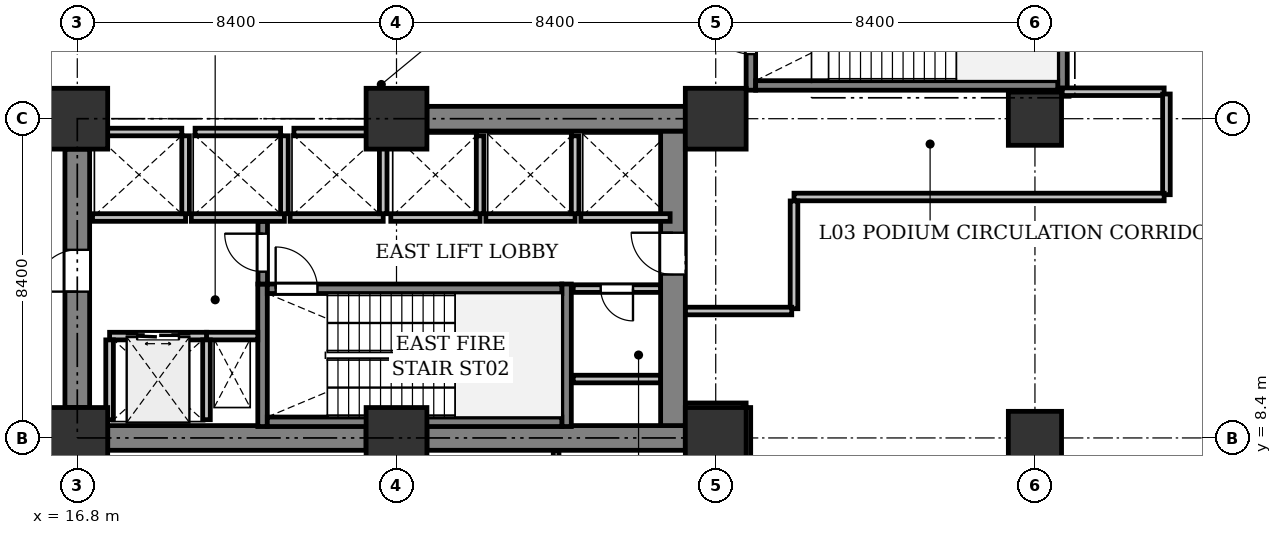
"""IFC4 building model, lengths in metres.
Left out: names, types, materials, properties, quantities, classifications, styles, units other than length and angle.
Written with IfcOpenShell. Run it as: python <this file> out.ifc"""

import sys

from ifc_helpers import new_model, si_unit, direction, frame, frame_2d, origin, origin_2d, place, context, subcontext, project, spatial, rectangle, extrude, element, fill, save


model = new_model("IFC4")
c1 = context("Model", 3, precision=1e-05, world=origin(), true_north=direction((0.0, 1.0)))
c2 = subcontext(c1, "Body", "Model", "MODEL_VIEW")
j1 = project(units=[si_unit("LENGTHUNIT", "METRE"), si_unit("PLANEANGLEUNIT", "RADIAN")], contexts=[c1])
p1 = place(None, origin())
s1 = spatial("IfcSite", under=j1, at=p1, CompositionType="ELEMENT")
p2 = place(p1, origin())
s2 = spatial("IfcBuilding", under=s1, at=p2, CompositionType="ELEMENT")
p3 = place(p2, frame((0.0, 0.0, 15.0)))
s3 = spatial("IfcBuildingStorey", under=s2, at=p3, CompositionType="ELEMENT", Elevation=15.0)
for number, where, z_axis, x_axis in (
    (1, (16.8, 8.4, 0.0), (0.0, 0.0, 1.0), (1.0, 0.0, 0.0)),
    (2, (16.8, 16.8, 0.0), (0.0, 0.0, 1.0), (1.0, 0.0, 0.0)),
    (3, (25.2, 8.4, 0.0), (0.0, 0.0, 1.0), (1.0, 0.0, 0.0)),
    (4, (25.2, 16.8, 0.0), (0.0, 0.0, 1.0), (1.0, 0.0, 0.0)),
    (5, (33.6, 8.4, 0.0), (0.0, 0.0, 1.0), (1.0, 0.0, 0.0)),
    (6, (33.6, 16.8, 0.0), (0.0, 0.0, 1.0), (1.0, 0.0, 0.0)),
):
    element("IfcColumn", number, at=place(p3, frame(where, z_axis=z_axis, x_axis=x_axis)), inside=s3, PredefinedType="COLUMN", context=c2, shape_type="SweptSolid", body=[
        extrude(rectangle(XDim=1.6, YDim=1.6, at=origin_2d()), origin(), (0.0, 0.0, 1.0), 4.8),
    ])
for number, where, z_axis, x_axis in (
    (7, (42.0, 8.4, 0.0), (0.0, 0.0, 1.0), (1.0, 0.0, 0.0)),
    (8, (42.0, 16.8, 0.0), (0.0, 0.0, 1.0), (1.0, 0.0, 0.0)),
):
    element("IfcColumn", number, at=place(p3, frame(where, z_axis=z_axis, x_axis=x_axis)), inside=s3, PredefinedType="COLUMN", context=c2, shape_type="SweptSolid", body=[
        extrude(rectangle(XDim=1.4, YDim=1.4, at=origin_2d()), origin(), (0.0, 0.0, 1.0), 4.8),
    ])
p4 = place(p3, frame((17.6, 8.4, 0.0), z_axis=(0.0, 0.0, 1.0), x_axis=(1.0, 0.0, 0.0)))
e9 = element("IfcWall", 9, at=p4, inside=s3, PredefinedType="SHEAR", context=c2, shape_type="SweptSolid", body=[
    extrude(rectangle(XDim=6.8, YDim=0.65, at=frame_2d((3.4, 0.0))), origin(), (0.0, 0.0, 1.0), 4.45),
])
p5 = place(p3, frame((26.0, 8.4, 0.0), z_axis=(0.0, 0.0, 1.0), x_axis=(1.0, 0.0, 0.0)))
e10 = element("IfcWall", 10, at=p5, inside=s3, PredefinedType="SHEAR", context=c2, shape_type="SweptSolid", body=[
    extrude(rectangle(XDim=6.8, YDim=0.65, at=frame_2d((3.4, 0.0))), origin(), (0.0, 0.0, 1.0), 4.45),
])
p6 = place(p3, frame((32.475, 8.725, 0.0), z_axis=(0.0, 0.0, 1.0), x_axis=(0.0, 1.0, 0.0)))
e11 = element("IfcWall", 11, at=p6, inside=s3, PredefinedType="SHEAR", context=c2, shape_type="SweptSolid", body=[
    extrude(rectangle(XDim=7.75, YDim=0.65, at=frame_2d((3.875, 0.0))), origin(), (0.0, 0.0, 1.0), 4.45),
])
p7 = place(p6, frame((3.975, 0.0, 0.0)))
e12 = element("IfcOpeningElement", 12, at=p7, cuts=e11, PredefinedType="OPENING", context=c2, shape_type="SweptSolid", body=[
    extrude(rectangle(XDim=1.1, YDim=2.15, at=frame_2d((0.55, 1.075))), frame((0.0, 0.335, 0.0), z_axis=(0.0, -1.0, 0.0), x_axis=(1.0, 0.0, 0.0)), (0.0, 0.0, 1.0), 0.67),
])
p8 = place(p3, frame((16.8, 9.2, 0.0), z_axis=(0.0, 0.0, 1.0), x_axis=(0.0, 1.0, 0.0)))
e13 = element("IfcWall", 13, at=p8, inside=s3, PredefinedType="SHEAR", context=c2, shape_type="SweptSolid", body=[
    extrude(rectangle(XDim=6.8, YDim=0.65, at=frame_2d((3.4, 0.0))), origin(), (0.0, 0.0, 1.0), 4.45),
])
p9 = place(p8, frame((3.05, 0.0, 0.0)))
e14 = element("IfcOpeningElement", 14, at=p9, cuts=e13, PredefinedType="OPENING", context=c2, shape_type="SweptSolid", body=[
    extrude(rectangle(XDim=1.1, YDim=2.15, at=frame_2d((0.55, 1.075))), frame((0.0, 0.335, 0.0), z_axis=(0.0, -1.0, 0.0), x_axis=(1.0, 0.0, 0.0)), (0.0, 0.0, 1.0), 0.67),
])
p10 = place(p3, frame((26.0, 16.8, 0.0), z_axis=(0.0, 0.0, 1.0), x_axis=(1.0, 0.0, 0.0)))
e15 = element("IfcWall", 15, at=p10, inside=s3, PredefinedType="SHEAR", context=c2, shape_type="SweptSolid", body=[
    extrude(rectangle(XDim=6.8, YDim=0.65, at=frame_2d((3.4, 0.0))), origin(), (0.0, 0.0, 1.0), 4.45),
])
for number, where, z_axis, x_axis in (
    (16, (21.675, 8.7, 0.0), (0.0, 0.0, 1.0), (0.0, 1.0, 0.0)),
    (17, (29.675, 8.7, 0.0), (0.0, 0.0, 1.0), (0.0, 1.0, 0.0)),
):
    element("IfcWall", number, at=place(p3, frame(where, z_axis=z_axis, x_axis=x_axis)), inside=s3, PredefinedType="SHEAR", context=c2, shape_type="SweptSolid", body=[
        extrude(rectangle(XDim=3.75, YDim=0.25, at=frame_2d((1.875, 0.0))), origin(), (0.0, 0.0, 1.0), 4.45),
    ])
p11 = place(p3, frame((21.8, 8.825, 0.0), z_axis=(0.0, 0.0, 1.0), x_axis=(1.0, 0.0, 0.0)))
e18 = element("IfcWall", 18, at=p11, inside=s3, PredefinedType="SHEAR", context=c2, shape_type="SweptSolid", body=[
    extrude(rectangle(XDim=7.75, YDim=0.25, at=frame_2d((3.875, 0.0))), origin(), (0.0, 0.0, 1.0), 4.45),
])
p12 = place(p3, frame((21.8, 12.325, 0.0), z_axis=(0.0, 0.0, 1.0), x_axis=(1.0, 0.0, 0.0)))
e19 = element("IfcWall", 19, at=p12, inside=s3, PredefinedType="SHEAR", context=c2, shape_type="SweptSolid", body=[
    extrude(rectangle(XDim=7.75, YDim=0.25, at=frame_2d((3.875, 0.0))), origin(), (0.0, 0.0, 1.0), 4.45),
])
p13 = place(p12, frame((0.22, 0.0, 0.0)))
e20 = element("IfcOpeningElement", 20, at=p13, cuts=e19, PredefinedType="OPENING", context=c2, shape_type="SweptSolid", body=[
    extrude(rectangle(XDim=1.1, YDim=2.15, at=frame_2d((0.55, 1.075))), frame((0.0, 0.135, 0.0), z_axis=(0.0, -1.0, 0.0), x_axis=(1.0, 0.0, 0.0)), (0.0, 0.0, 1.0), 0.27),
])
p14 = place(p3, frame((34.525, 17.55, 0.0), z_axis=(0.0, 0.0, 1.0), x_axis=(0.0, 1.0, 0.0)))
e21 = element("IfcWall", 21, at=p14, inside=s3, PredefinedType="SHEAR", context=c2, shape_type="SweptSolid", body=[
    extrude(rectangle(XDim=4.45, YDim=0.25, at=frame_2d((2.225, 0.0))), origin(), (0.0, 0.0, 1.0), 4.45),
])
p15 = place(p14, frame((0.95, 0.0, 0.0)))
e22 = element("IfcOpeningElement", 22, at=p15, cuts=e21, PredefinedType="OPENING", context=c2, shape_type="SweptSolid", body=[
    extrude(rectangle(XDim=1.1, YDim=2.15, at=frame_2d((0.55, 1.075))), frame((0.0, 0.135, 0.0), z_axis=(0.0, -1.0, 0.0), x_axis=(1.0, 0.0, 0.0)), (0.0, 0.0, 1.0), 0.27),
])
p16 = place(p3, frame((42.725, 17.55, 0.0), z_axis=(0.0, 0.0, 1.0), x_axis=(0.0, 1.0, 0.0)))
e23 = element("IfcWall", 23, at=p16, inside=s3, PredefinedType="SHEAR", context=c2, shape_type="SweptSolid", body=[
    extrude(rectangle(XDim=4.45, YDim=0.25, at=frame_2d((2.225, 0.0))), origin(), (0.0, 0.0, 1.0), 4.45),
])
p17 = place(p3, frame((34.65, 17.675, 0.0), z_axis=(0.0, 0.0, 1.0), x_axis=(1.0, 0.0, 0.0)))
e24 = element("IfcWall", 24, at=p17, inside=s3, PredefinedType="SHEAR", context=c2, shape_type="SweptSolid", body=[
    extrude(rectangle(XDim=7.95, YDim=0.25, at=frame_2d((3.975, 0.0))), origin(), (0.0, 0.0, 1.0), 4.45),
])
p18 = place(p3, frame((20.2, 11.08, 0.0), z_axis=(0.0, 0.0, 1.0), x_axis=(1.0, 0.0, 0.0)))
e25 = element("IfcWall", 25, at=p18, inside=s3, PredefinedType="PARTITIONING", context=c2, shape_type="SweptSolid", body=[
    extrude(rectangle(XDim=1.35, YDim=0.2, at=frame_2d((0.675, 0.0))), origin(), (0.0, 0.0, 1.0), 4.45),
])
p19 = place(p3, frame((21.68, 12.45, 0.0), z_axis=(0.0, 0.0, 1.0), x_axis=(0.0, 1.0, 0.0)))
e26 = element("IfcWall", 26, at=p19, inside=s3, PredefinedType="SHEAR", context=c2, shape_type="SweptSolid", body=[
    extrude(rectangle(XDim=1.65, YDim=0.25, at=frame_2d((0.825, 0.0))), origin(), (0.0, 0.0, 1.0), 4.45),
])
p20 = place(p19, frame((0.325, 0.0, 0.0)))
e27 = element("IfcOpeningElement", 27, at=p20, cuts=e26, PredefinedType="OPENING", context=c2, shape_type="SweptSolid", body=[
    extrude(rectangle(XDim=1.0, YDim=2.15, at=frame_2d((0.5, 1.075))), frame((0.0, 0.135, 0.0), z_axis=(0.0, -1.0, 0.0), x_axis=(1.0, 0.0, 0.0)), (0.0, 0.0, 1.0), 0.27),
])
p21 = place(p3, frame((17.65, 11.08, 0.0), z_axis=(0.0, 0.0, 1.0), x_axis=(1.0, 0.0, 0.0)))
e28 = element("IfcWall", 28, at=p21, inside=s3, PredefinedType="PARTITIONING", context=c2, shape_type="SweptSolid", body=[
    extrude(rectangle(XDim=2.55, YDim=0.2, at=frame_2d((1.275, 0.0))), origin(), (0.0, 0.0, 1.0), 4.45),
])
p22 = place(p21, frame((0.725, 0.0, 0.0)))
e29 = element("IfcOpeningElement", 29, at=p22, cuts=e28, PredefinedType="OPENING", context=c2, shape_type="SweptSolid", body=[
    extrude(rectangle(XDim=1.1, YDim=2.2, at=frame_2d((0.55, 1.1))), frame((0.0, 0.11, 0.0), z_axis=(0.0, -1.0, 0.0), x_axis=(1.0, 0.0, 0.0)), (0.0, 0.0, 1.0), 0.22),
])
for number, where, z_axis, x_axis in (
    (30, (20.2, 8.88, 0.0), (0.0, 0.0, 1.0), (0.0, 1.0, 0.0)),
    (31, (17.65, 8.88, 0.0), (0.0, 0.0, 1.0), (0.0, 1.0, 0.0)),
):
    element("IfcWall", number, at=place(p3, frame(where, z_axis=z_axis, x_axis=x_axis)), inside=s3, PredefinedType="PARTITIONING", context=c2, shape_type="SweptSolid", body=[
        extrude(rectangle(XDim=2.1, YDim=0.2, at=frame_2d((1.05, 0.0))), origin(), (0.0, 0.0, 1.0), 4.45),
    ])
p23 = place(p3, frame((17.2, 14.2, 0.0), z_axis=(0.0, 0.0, 1.0), x_axis=(1.0, 0.0, 0.0)))
e32 = element("IfcWall", 32, at=p23, inside=s3, PredefinedType="PARTITIONING", context=c2, shape_type="SweptSolid", body=[
    extrude(rectangle(XDim=2.45, YDim=0.2, at=frame_2d((1.225, 0.0))), origin(), (0.0, 0.0, 1.0), 4.45),
])
p24 = place(p3, frame((19.65, 14.3, 0.0), z_axis=(0.0, 0.0, 1.0), x_axis=(0.0, 1.0, 0.0)))
e33 = element("IfcWall", 33, at=p24, inside=s3, PredefinedType="PARTITIONING", context=c2, shape_type="SweptSolid", body=[
    extrude(rectangle(XDim=2.05, YDim=0.2, at=frame_2d((1.025, 0.0))), origin(), (0.0, 0.0, 1.0), 4.45),
])
p25 = place(p3, frame((17.3, 16.45, 0.0), z_axis=(0.0, 0.0, 1.0), x_axis=(1.0, 0.0, 0.0)))
e34 = element("IfcWall", 34, at=p25, inside=s3, PredefinedType="PARTITIONING", context=c2, shape_type="SweptSolid", body=[
    extrude(rectangle(XDim=2.25, YDim=0.2, at=frame_2d((1.125, 0.0))), origin(), (0.0, 0.0, 1.0), 3.05),
])
p26 = place(p3, frame((19.8, 14.2, 0.0), z_axis=(0.0, 0.0, 1.0), x_axis=(1.0, 0.0, 0.0)))
e35 = element("IfcWall", 35, at=p26, inside=s3, PredefinedType="PARTITIONING", context=c2, shape_type="SweptSolid", body=[
    extrude(rectangle(XDim=2.45, YDim=0.2, at=frame_2d((1.225, 0.0))), origin(), (0.0, 0.0, 1.0), 4.45),
])
p27 = place(p3, frame((22.25, 14.3, 0.0), z_axis=(0.0, 0.0, 1.0), x_axis=(0.0, 1.0, 0.0)))
e36 = element("IfcWall", 36, at=p27, inside=s3, PredefinedType="PARTITIONING", context=c2, shape_type="SweptSolid", body=[
    extrude(rectangle(XDim=2.05, YDim=0.2, at=frame_2d((1.025, 0.0))), origin(), (0.0, 0.0, 1.0), 4.45),
])
p28 = place(p3, frame((19.9, 16.45, 0.0), z_axis=(0.0, 0.0, 1.0), x_axis=(1.0, 0.0, 0.0)))
e37 = element("IfcWall", 37, at=p28, inside=s3, PredefinedType="PARTITIONING", context=c2, shape_type="SweptSolid", body=[
    extrude(rectangle(XDim=2.25, YDim=0.2, at=frame_2d((1.125, 0.0))), origin(), (0.0, 0.0, 1.0), 3.05),
])
p29 = place(p3, frame((22.4, 14.2, 0.0), z_axis=(0.0, 0.0, 1.0), x_axis=(1.0, 0.0, 0.0)))
e38 = element("IfcWall", 38, at=p29, inside=s3, PredefinedType="PARTITIONING", context=c2, shape_type="SweptSolid", body=[
    extrude(rectangle(XDim=2.45, YDim=0.2, at=frame_2d((1.225, 0.0))), origin(), (0.0, 0.0, 1.0), 4.45),
])
p30 = place(p3, frame((24.85, 14.3, 0.0), z_axis=(0.0, 0.0, 1.0), x_axis=(0.0, 1.0, 0.0)))
e39 = element("IfcWall", 39, at=p30, inside=s3, PredefinedType="PARTITIONING", context=c2, shape_type="SweptSolid", body=[
    extrude(rectangle(XDim=2.05, YDim=0.2, at=frame_2d((1.025, 0.0))), origin(), (0.0, 0.0, 1.0), 4.45),
])
p31 = place(p3, frame((22.5, 16.45, 0.0), z_axis=(0.0, 0.0, 1.0), x_axis=(1.0, 0.0, 0.0)))
e40 = element("IfcWall", 40, at=p31, inside=s3, PredefinedType="PARTITIONING", context=c2, shape_type="SweptSolid", body=[
    extrude(rectangle(XDim=2.25, YDim=0.2, at=frame_2d((1.125, 0.0))), origin(), (0.0, 0.0, 1.0), 3.05),
])
p32 = place(p3, frame((25.05, 14.2, 0.0), z_axis=(0.0, 0.0, 1.0), x_axis=(1.0, 0.0, 0.0)))
e41 = element("IfcWall", 41, at=p32, inside=s3, PredefinedType="PARTITIONING", context=c2, shape_type="SweptSolid", body=[
    extrude(rectangle(XDim=2.35, YDim=0.2, at=frame_2d((1.175, 0.0))), origin(), (0.0, 0.0, 1.0), 4.45),
])
p33 = place(p3, frame((27.4, 14.3, 0.0), z_axis=(0.0, 0.0, 1.0), x_axis=(0.0, 1.0, 0.0)))
e42 = element("IfcWall", 42, at=p33, inside=s3, PredefinedType="PARTITIONING", context=c2, shape_type="SweptSolid", body=[
    extrude(rectangle(XDim=2.05, YDim=0.2, at=frame_2d((1.025, 0.0))), origin(), (0.0, 0.0, 1.0), 4.45),
])
p34 = place(p3, frame((27.55, 14.2, 0.0), z_axis=(0.0, 0.0, 1.0), x_axis=(1.0, 0.0, 0.0)))
e43 = element("IfcWall", 43, at=p34, inside=s3, PredefinedType="PARTITIONING", context=c2, shape_type="SweptSolid", body=[
    extrude(rectangle(XDim=2.35, YDim=0.2, at=frame_2d((1.175, 0.0))), origin(), (0.0, 0.0, 1.0), 4.45),
])
p35 = place(p3, frame((29.9, 14.3, 0.0), z_axis=(0.0, 0.0, 1.0), x_axis=(0.0, 1.0, 0.0)))
e44 = element("IfcWall", 44, at=p35, inside=s3, PredefinedType="PARTITIONING", context=c2, shape_type="SweptSolid", body=[
    extrude(rectangle(XDim=2.05, YDim=0.2, at=frame_2d((1.025, 0.0))), origin(), (0.0, 0.0, 1.0), 4.45),
])
p36 = place(p3, frame((30.05, 14.2, 0.0), z_axis=(0.0, 0.0, 1.0), x_axis=(1.0, 0.0, 0.0)))
e45 = element("IfcWall", 45, at=p36, inside=s3, PredefinedType="PARTITIONING", context=c2, shape_type="SweptSolid", body=[
    extrude(rectangle(XDim=2.35, YDim=0.2, at=frame_2d((1.175, 0.0))), origin(), (0.0, 0.0, 1.0), 4.45),
])
p37 = place(p3, frame((32.146, 12.33, 0.0), z_axis=(0.0, 0.0, 1.0), x_axis=(-1.0, 0.0, 0.0)))
e46 = element("IfcWall", 46, at=p37, inside=s3, PredefinedType="PARTITIONING", context=c2, shape_type="SweptSolid", body=[
    extrude(rectangle(XDim=2.296, YDim=0.2, at=frame_2d((1.148, 0.0))), origin(), (0.0, 0.0, 1.0), 4.45),
])
p38 = place(p37, frame((0.723, 0.0, 0.0)))
e47 = element("IfcOpeningElement", 47, at=p38, cuts=e46, PredefinedType="OPENING", context=c2, shape_type="SweptSolid", body=[
    extrude(rectangle(XDim=0.85, YDim=2.15, at=frame_2d((0.425, 1.075))), frame((0.0, 0.11, 0.0), z_axis=(0.0, -1.0, 0.0), x_axis=(1.0, 0.0, 0.0)), (0.0, 0.0, 1.0), 0.22),
])
p39 = place(p3, frame((29.85, 9.95, 0.0), z_axis=(0.0, 0.0, 1.0), x_axis=(1.0, 0.0, 0.0)))
e48 = element("IfcWall", 48, at=p39, inside=s3, PredefinedType="PARTITIONING", context=c2, shape_type="SweptSolid", body=[
    extrude(rectangle(XDim=2.296, YDim=0.2, at=frame_2d((1.148, 0.0))), origin(), (0.0, 0.0, 1.0), 4.45),
])
p40 = place(p3, frame((29.4, 0.52, 0.0), z_axis=(0.0, 0.0, 1.0), x_axis=(0.0, 1.0, 0.0)))
e49 = element("IfcWall", 49, at=p40, inside=s3, PredefinedType="PARTITIONING", context=c2, shape_type="SweptSolid", body=[
    extrude(rectangle(XDim=7.551, YDim=0.15, at=frame_2d((3.775, 0.0))), origin(), (0.0, 0.0, 1.0), 4.044),
])
p41 = place(p3, frame((42.717, 17.51, 0.0), z_axis=(0.0, 0.0, 1.0), x_axis=(1.0, 0.0, 0.0)))
e50 = element("IfcWall", 50, at=p41, inside=s3, PredefinedType="PARTITIONING", context=c2, shape_type="SweptSolid", body=[
    extrude(rectangle(XDim=2.683, YDim=0.2, at=frame_2d((1.341, 0.0))), origin(), (0.0, 0.0, 1.0), 4.45),
])
p42 = place(p3, frame((45.46, 17.45, 0.0), z_axis=(0.0, 0.0, 1.0), x_axis=(0.0, -1.0, 0.0)))
e51 = element("IfcWall", 51, at=p42, inside=s3, PredefinedType="PARTITIONING", context=c2, shape_type="SweptSolid", body=[
    extrude(rectangle(XDim=2.65, YDim=0.2, at=frame_2d((1.325, 0.0))), origin(), (0.0, 0.0, 1.0), 3.05),
])
p43 = place(p3, frame((45.4, 14.74, 0.0), z_axis=(0.0, 0.0, 1.0), x_axis=(-1.0, 0.0, 0.0)))
e52 = element("IfcWall", 52, at=p43, inside=s3, PredefinedType="PARTITIONING", context=c2, shape_type="SweptSolid", body=[
    extrude(rectangle(XDim=9.74, YDim=0.2, at=frame_2d((4.87, 0.0))), origin(), (0.0, 0.0, 1.0), 3.25),
])
p44 = place(p3, frame((35.66, 14.636, 0.0), z_axis=(0.0, 0.0, 1.0), x_axis=(0.0, -1.0, 0.0)))
e53 = element("IfcWall", 53, at=p44, inside=s3, PredefinedType="PARTITIONING", context=c2, shape_type="SweptSolid", body=[
    extrude(rectangle(XDim=2.836, YDim=0.2, at=frame_2d((1.418, 0.0))), origin(), (0.0, 0.0, 1.0), 4.45),
])
p45 = place(p3, frame((35.6, 11.74, 0.0), z_axis=(0.0, 0.0, 1.0), x_axis=(-1.0, 0.0, 0.0)))
e54 = element("IfcWall", 54, at=p45, inside=s3, PredefinedType="PARTITIONING", context=c2, shape_type="SweptSolid", body=[
    extrude(rectangle(XDim=2.796, YDim=0.2, at=frame_2d((1.398, 0.0))), origin(), (0.0, 0.0, 1.0), 3.25),
])
p46 = place(p3, frame((32.804, 9.22, 0.0), z_axis=(0.0, 0.0, 1.0), x_axis=(1.0, 0.0, 0.0)))
e55 = element("IfcWall", 55, at=p46, inside=s3, PredefinedType="PARTITIONING", context=c2, shape_type="SweptSolid", body=[
    extrude(rectangle(XDim=1.596, YDim=0.2, at=frame_2d((0.798, 0.0))), origin(), (0.0, 0.0, 1.0), 3.25),
])
p47 = place(p3, frame((34.42, 9.2, 0.0), z_axis=(0.0, 0.0, 1.0), x_axis=(0.0, -1.0, 0.0)))
e56 = element("IfcWall", 56, at=p47, inside=s3, PredefinedType="PARTITIONING", context=c2, shape_type="SweptSolid", body=[
    extrude(rectangle(XDim=1.6, YDim=0.2, at=frame_2d((0.8, 0.0))), origin(), (0.0, 0.0, 1.0), 3.05),
])
p48 = place(p7, origin())
e57 = element("IfcDoor", 57, at=p48, inside=s3, OperationType="SINGLE_SWING_RIGHT", PredefinedType="DOOR", context=c2, shape_type="SweptSolid", body=[
    extrude(rectangle(XDim=1.1, YDim=2.15, at=frame_2d((0.55, 1.075))), frame((0.0, 0.025, 0.0), z_axis=(0.0, -1.0, 0.0), x_axis=(1.0, 0.0, 0.0)), (0.0, 0.0, 1.0), 0.05),
])
fill(e12, e57)
p49 = place(p9, origin())
e58 = element("IfcDoor", 58, at=p49, inside=s3, OperationType="SINGLE_SWING_LEFT", PredefinedType="DOOR", context=c2, shape_type="SweptSolid", body=[
    extrude(rectangle(XDim=1.1, YDim=2.15, at=frame_2d((0.55, 1.075))), frame((0.0, 0.025, 0.0), z_axis=(0.0, -1.0, 0.0), x_axis=(1.0, 0.0, 0.0)), (0.0, 0.0, 1.0), 0.05),
])
fill(e14, e58)
p50 = place(p13, origin())
e59 = element("IfcDoor", 59, at=p50, inside=s3, OperationType="SINGLE_SWING_LEFT", PredefinedType="DOOR", context=c2, shape_type="SweptSolid", body=[
    extrude(rectangle(XDim=1.1, YDim=2.15, at=frame_2d((0.55, 1.075))), frame((0.0, 0.025, 0.0), z_axis=(0.0, -1.0, 0.0), x_axis=(1.0, 0.0, 0.0)), (0.0, 0.0, 1.0), 0.05),
])
fill(e20, e59)
p51 = place(p15, origin())
e60 = element("IfcDoor", 60, at=p51, inside=s3, OperationType="SINGLE_SWING_RIGHT", PredefinedType="DOOR", context=c2, shape_type="SweptSolid", body=[
    extrude(rectangle(XDim=1.1, YDim=2.15, at=frame_2d((0.55, 1.075))), frame((0.0, 0.025, 0.0), z_axis=(0.0, -1.0, 0.0), x_axis=(1.0, 0.0, 0.0)), (0.0, 0.0, 1.0), 0.05),
])
fill(e22, e60)
p52 = place(p20, origin())
e61 = element("IfcDoor", 61, at=p52, inside=s3, OperationType="SINGLE_SWING_RIGHT", PredefinedType="DOOR", context=c2, shape_type="SweptSolid", body=[
    extrude(rectangle(XDim=1.0, YDim=2.15, at=frame_2d((0.5, 1.075))), frame((0.0, 0.025, 0.0), z_axis=(0.0, -1.0, 0.0), x_axis=(1.0, 0.0, 0.0)), (0.0, 0.0, 1.0), 0.05),
])
fill(e27, e61)
p53 = place(p22, origin())
e62 = element("IfcDoor", 62, at=p53, inside=s3, OperationType="DOUBLE_DOOR_SLIDING", PredefinedType="DOOR", context=c2, shape_type="SweptSolid", body=[
    extrude(rectangle(XDim=1.1, YDim=2.2, at=frame_2d((0.55, 1.1))), frame((0.0, 0.025, 0.0), z_axis=(0.0, -1.0, 0.0), x_axis=(1.0, 0.0, 0.0)), (0.0, 0.0, 1.0), 0.05),
])
fill(e29, e62)
p54 = place(p38, origin())
e63 = element("IfcDoor", 63, at=p54, inside=s3, OperationType="SINGLE_SWING_LEFT", PredefinedType="DOOR", context=c2, shape_type="SweptSolid", body=[
    extrude(rectangle(XDim=0.85, YDim=2.15, at=frame_2d((0.425, 1.075))), frame((0.0, 0.025, 0.0), z_axis=(0.0, -1.0, 0.0), x_axis=(1.0, 0.0, 0.0)), (0.0, 0.0, 1.0), 0.05),
])
fill(e47, e63)
save(model, sys.argv[1])
